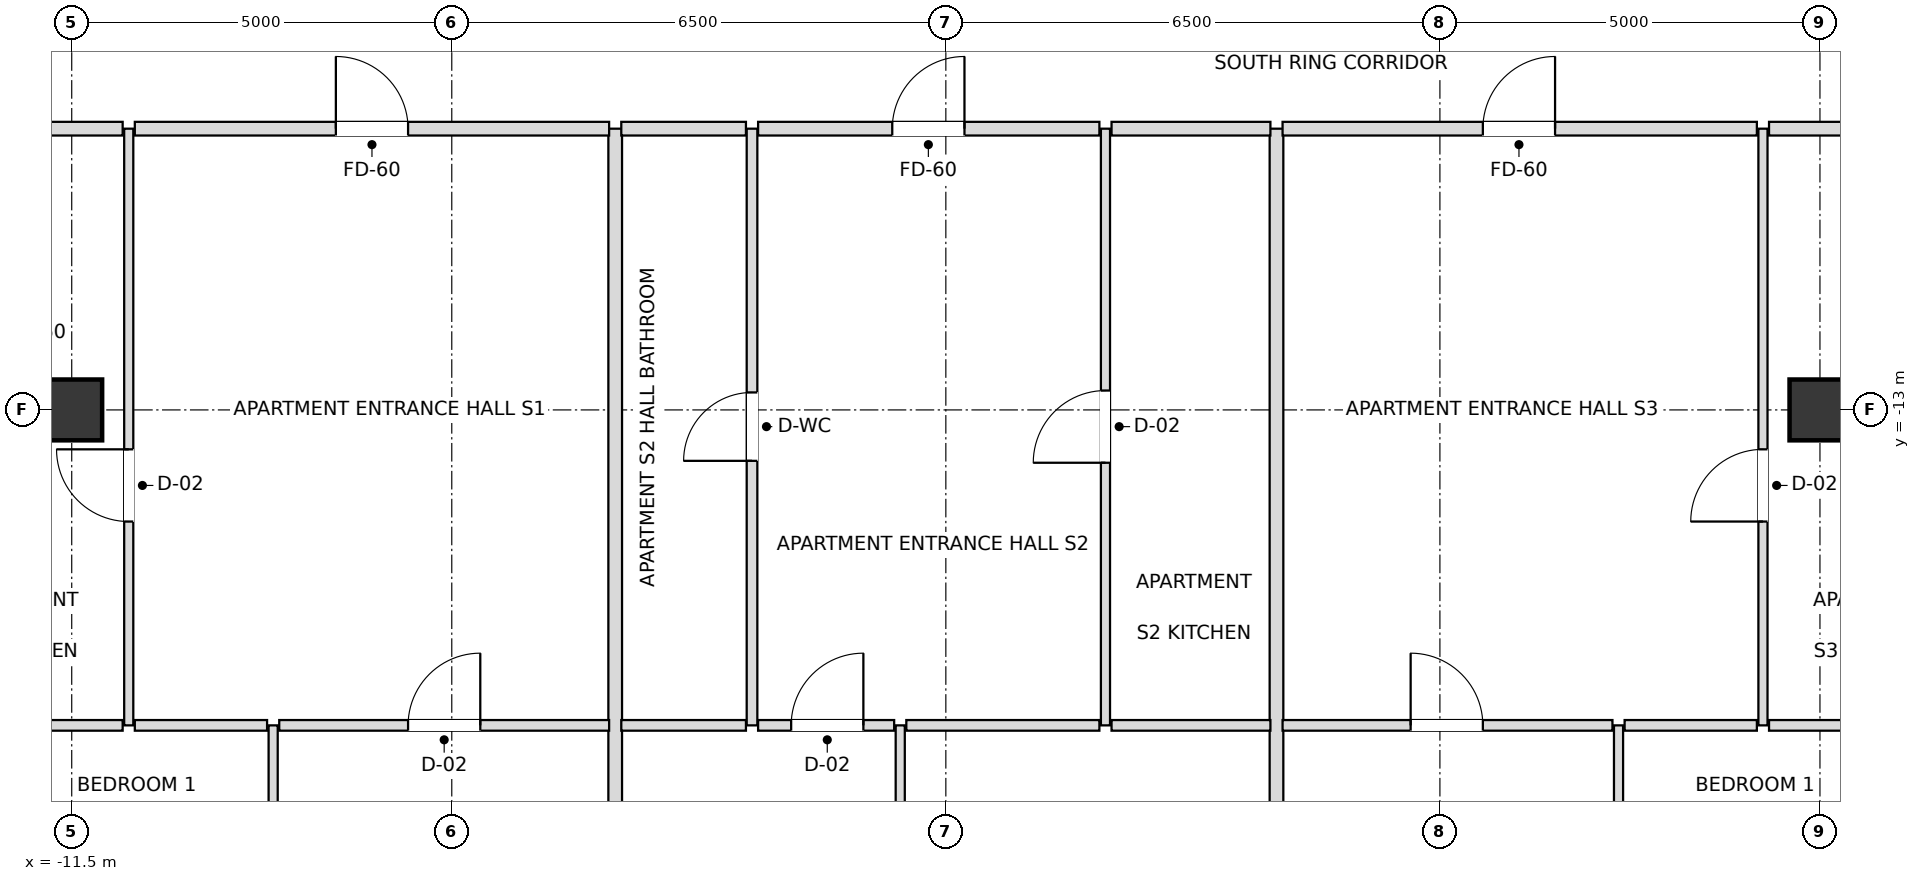
"""IFC4 building model, lengths in metres.
Left out: names, types, materials, properties, quantities, classifications, styles, units other than length and angle.
Written with IfcOpenShell. Run it as: python <this file> out.ifc"""

import sys

from ifc_helpers import new_model, si_unit, direction, frame, frame_2d, origin, origin_2d, place, context, subcontext, project, spatial, rectangle, extrude, element, fill, save


model = new_model("IFC4")
c1 = context("Model", 3, precision=1e-05, world=origin(), true_north=direction((0.0, 1.0)))
c2 = subcontext(c1, "Body", "Model", "MODEL_VIEW")
j1 = project(units=[si_unit("LENGTHUNIT", "METRE"), si_unit("PLANEANGLEUNIT", "RADIAN")], contexts=[c1])
p1 = place(None, origin())
s1 = spatial("IfcSite", under=j1, at=p1, CompositionType="ELEMENT")
p2 = place(p1, origin())
s2 = spatial("IfcBuilding", under=s1, at=p2, CompositionType="ELEMENT")
p3 = place(p2, frame((0.0, 0.0, 117.0)))
s3 = spatial("IfcBuildingStorey", under=s2, at=p3, CompositionType="ELEMENT", Elevation=117.0)
for number, where, z_axis, x_axis in (
    (1, (-11.5, -13.0, 0.0), (0.0, 0.0, 1.0), (1.0, 0.0, 0.0)),
    (2, (11.5, -13.0, 0.0), (0.0, 0.0, 1.0), (1.0, 0.0, 0.0)),
):
    element("IfcColumn", number, at=place(p3, frame(where, z_axis=z_axis, x_axis=x_axis)), inside=s3, PredefinedType="COLUMN", context=c2, shape_type="SweptSolid", body=[
        extrude(rectangle(XDim=0.8, YDim=0.8, at=origin_2d()), origin(), (0.0, 0.0, 1.0), 3.6),
    ])
p4 = place(p3, frame((-10.75, -17.15, 0.0), z_axis=(0.0, 0.0, 1.0), x_axis=(0.0, 1.0, 0.0)))
e3 = element("IfcWall", 3, at=p4, inside=s3, PredefinedType="PARTITIONING", context=c2, shape_type="SweptSolid", body=[
    extrude(rectangle(XDim=7.85, YDim=0.12, at=frame_2d((3.925, 0.0))), origin(), (0.0, 0.0, 1.0), 2.736),
])
p5 = place(p4, frame((2.681, 0.0, 0.0)))
e4 = element("IfcOpeningElement", 4, at=p5, cuts=e3, PredefinedType="OPENING", context=c2, shape_type="SweptSolid", body=[
    extrude(rectangle(XDim=0.95, YDim=2.1, at=frame_2d((0.475, 1.05))), frame((0.0, 0.07, 0.0), z_axis=(0.0, -1.0, 0.0), x_axis=(1.0, 0.0, 0.0)), (0.0, 0.0, 1.0), 0.14),
])
p6 = place(p3, frame((-8.85, -23.15, 0.0), z_axis=(0.0, 0.0, 1.0), x_axis=(0.0, 1.0, 0.0)))
e5 = element("IfcWall", 5, at=p6, inside=s3, PredefinedType="PARTITIONING", context=c2, shape_type="SweptSolid", body=[
    extrude(rectangle(XDim=6.0, YDim=0.12, at=frame_2d((3.0, 0.0))), origin(), (0.0, 0.0, 1.0), 2.736),
])
p7 = place(p6, frame((2.55, 0.0, 0.0)))
e6 = element("IfcOpeningElement", 6, at=p7, cuts=e5, PredefinedType="OPENING", context=c2, shape_type="SweptSolid", body=[
    extrude(rectangle(XDim=0.9, YDim=2.1, at=frame_2d((0.45, 1.05))), frame((0.0, 0.07, 0.0), z_axis=(0.0, -1.0, 0.0), x_axis=(1.0, 0.0, 0.0)), (0.0, 0.0, 1.0), 0.14),
])
p8 = place(p3, frame((-4.35, -23.15, 0.0), z_axis=(0.0, 0.0, 1.0), x_axis=(0.0, 1.0, 0.0)))
e7 = element("IfcWall", 7, at=p8, inside=s3, PredefinedType="PARTITIONING", context=c2, shape_type="SweptSolid", body=[
    extrude(rectangle(XDim=13.85, YDim=0.18, at=frame_2d((6.925, 0.0))), origin(), (0.0, 0.0, 1.0), 2.736),
])
p9 = place(p3, frame((-2.55, -17.15, 0.0), z_axis=(0.0, 0.0, 1.0), x_axis=(0.0, 1.0, 0.0)))
e8 = element("IfcWall", 8, at=p9, inside=s3, PredefinedType="PARTITIONING", context=c2, shape_type="SweptSolid", body=[
    extrude(rectangle(XDim=7.85, YDim=0.14, at=frame_2d((3.925, 0.0))), origin(), (0.0, 0.0, 1.0), 3.3),
])
p10 = place(p9, frame((3.48, 0.0, 0.0)))
e9 = element("IfcOpeningElement", 9, at=p10, cuts=e8, PredefinedType="OPENING", context=c2, shape_type="SweptSolid", body=[
    extrude(rectangle(XDim=0.9, YDim=2.1, at=frame_2d((0.45, 1.05))), frame((0.0, 0.08, 0.0), z_axis=(0.0, -1.0, 0.0), x_axis=(1.0, 0.0, 0.0)), (0.0, 0.0, 1.0), 0.16),
])
p11 = place(p3, frame((-0.6, -23.15, 0.0), z_axis=(0.0, 0.0, 1.0), x_axis=(0.0, 1.0, 0.0)))
e10 = element("IfcWall", 10, at=p11, inside=s3, PredefinedType="PARTITIONING", context=c2, shape_type="SweptSolid", body=[
    extrude(rectangle(XDim=6.0, YDim=0.12, at=frame_2d((3.0, 0.0))), origin(), (0.0, 0.0, 1.0), 2.736),
])
p12 = place(p11, frame((2.55, 0.0, 0.0)))
e11 = element("IfcOpeningElement", 11, at=p12, cuts=e10, PredefinedType="OPENING", context=c2, shape_type="SweptSolid", body=[
    extrude(rectangle(XDim=0.9, YDim=2.1, at=frame_2d((0.45, 1.05))), frame((0.0, 0.07, 0.0), z_axis=(0.0, -1.0, 0.0), x_axis=(1.0, 0.0, 0.0)), (0.0, 0.0, 1.0), 0.14),
])
p13 = place(p3, frame((2.1, -17.15, 0.0), z_axis=(0.0, 0.0, 1.0), x_axis=(0.0, 1.0, 0.0)))
e12 = element("IfcWall", 12, at=p13, inside=s3, PredefinedType="PARTITIONING", context=c2, shape_type="SweptSolid", body=[
    extrude(rectangle(XDim=7.85, YDim=0.12, at=frame_2d((3.925, 0.0))), origin(), (0.0, 0.0, 1.0), 3.3),
])
p14 = place(p13, frame((3.455, 0.0, 0.0)))
e13 = element("IfcOpeningElement", 13, at=p14, cuts=e12, PredefinedType="OPENING", context=c2, shape_type="SweptSolid", body=[
    extrude(rectangle(XDim=0.95, YDim=2.1, at=frame_2d((0.475, 1.05))), frame((0.0, 0.07, 0.0), z_axis=(0.0, -1.0, 0.0), x_axis=(1.0, 0.0, 0.0)), (0.0, 0.0, 1.0), 0.14),
])
p15 = place(p3, frame((4.35, -23.15, 0.0), z_axis=(0.0, 0.0, 1.0), x_axis=(0.0, 1.0, 0.0)))
e14 = element("IfcWall", 14, at=p15, inside=s3, PredefinedType="PARTITIONING", context=c2, shape_type="SweptSolid", body=[
    extrude(rectangle(XDim=13.85, YDim=0.18, at=frame_2d((6.925, 0.0))), origin(), (0.0, 0.0, 1.0), 2.736),
])
p16 = place(p3, frame((8.85, -23.15, 0.0), z_axis=(0.0, 0.0, 1.0), x_axis=(0.0, 1.0, 0.0)))
e15 = element("IfcWall", 15, at=p16, inside=s3, PredefinedType="PARTITIONING", context=c2, shape_type="SweptSolid", body=[
    extrude(rectangle(XDim=6.0, YDim=0.12, at=frame_2d((3.0, 0.0))), origin(), (0.0, 0.0, 1.0), 2.736),
])
p17 = place(p16, frame((2.55, 0.0, 0.0)))
e16 = element("IfcOpeningElement", 16, at=p17, cuts=e15, PredefinedType="OPENING", context=c2, shape_type="SweptSolid", body=[
    extrude(rectangle(XDim=0.9, YDim=2.1, at=frame_2d((0.45, 1.05))), frame((0.0, 0.07, 0.0), z_axis=(0.0, -1.0, 0.0), x_axis=(1.0, 0.0, 0.0)), (0.0, 0.0, 1.0), 0.14),
])
p18 = place(p3, frame((10.75, -17.15, 0.0), z_axis=(0.0, 0.0, 1.0), x_axis=(0.0, 1.0, 0.0)))
e17 = element("IfcWall", 17, at=p18, inside=s3, PredefinedType="PARTITIONING", context=c2, shape_type="SweptSolid", body=[
    extrude(rectangle(XDim=7.85, YDim=0.12, at=frame_2d((3.925, 0.0))), origin(), (0.0, 0.0, 1.0), 2.736),
])
p19 = place(p18, frame((2.681, 0.0, 0.0)))
e18 = element("IfcOpeningElement", 18, at=p19, cuts=e17, PredefinedType="OPENING", context=c2, shape_type="SweptSolid", body=[
    extrude(rectangle(XDim=0.95, YDim=2.1, at=frame_2d((0.475, 1.05))), frame((0.0, 0.07, 0.0), z_axis=(0.0, -1.0, 0.0), x_axis=(1.0, 0.0, 0.0)), (0.0, 0.0, 1.0), 0.14),
])
p20 = place(p3, frame((-12.17, -17.15, 0.0), z_axis=(0.0, 0.0, 1.0), x_axis=(1.0, 0.0, 0.0)))
e19 = element("IfcWall", 19, at=p20, inside=s3, PredefinedType="PARTITIONING", context=c2, shape_type="SweptSolid", body=[
    extrude(rectangle(XDim=1.34, YDim=0.14, at=frame_2d((0.67, 0.0))), origin(), (0.0, 0.0, 1.0), 2.656),
])
p21 = place(p3, frame((-10.67, -17.15, 0.0), z_axis=(0.0, 0.0, 1.0), x_axis=(1.0, 0.0, 0.0)))
e20 = element("IfcWall", 20, at=p21, inside=s3, PredefinedType="PARTITIONING", context=c2, shape_type="SweptSolid", body=[
    extrude(rectangle(XDim=1.74, YDim=0.14, at=frame_2d((0.87, 0.0))), origin(), (0.0, 0.0, 1.0), 3.3),
])
p22 = place(p3, frame((-8.77, -17.15, 0.0), z_axis=(0.0, 0.0, 1.0), x_axis=(1.0, 0.0, 0.0)))
e21 = element("IfcWall", 21, at=p22, inside=s3, PredefinedType="PARTITIONING", context=c2, shape_type="SweptSolid", body=[
    extrude(rectangle(XDim=4.34, YDim=0.14, at=frame_2d((2.17, 0.0))), origin(), (0.0, 0.0, 1.0), 2.736),
])
p23 = place(p22, frame((1.695, 0.0, 0.0)))
e22 = element("IfcOpeningElement", 22, at=p23, cuts=e21, PredefinedType="OPENING", context=c2, shape_type="SweptSolid", body=[
    extrude(rectangle(XDim=0.95, YDim=2.1, at=frame_2d((0.475, 1.05))), frame((0.0, 0.08, 0.0), z_axis=(0.0, -1.0, 0.0), x_axis=(1.0, 0.0, 0.0)), (0.0, 0.0, 1.0), 0.16),
])
p24 = place(p3, frame((-4.27, -17.15, 0.0), z_axis=(0.0, 0.0, 1.0), x_axis=(1.0, 0.0, 0.0)))
e23 = element("IfcWall", 23, at=p24, inside=s3, PredefinedType="PARTITIONING", context=c2, shape_type="SweptSolid", body=[
    extrude(rectangle(XDim=1.64, YDim=0.14, at=frame_2d((0.82, 0.0))), origin(), (0.0, 0.0, 1.0), 3.3),
])
p25 = place(p3, frame((-2.47, -17.15, 0.0), z_axis=(0.0, 0.0, 1.0), x_axis=(1.0, 0.0, 0.0)))
e24 = element("IfcWall", 24, at=p25, inside=s3, PredefinedType="PARTITIONING", context=c2, shape_type="SweptSolid", body=[
    extrude(rectangle(XDim=1.79, YDim=0.14, at=frame_2d((0.895, 0.0))), origin(), (0.0, 0.0, 1.0), 3.3),
])
p26 = place(p25, frame((0.435, 0.0, 0.0)))
e25 = element("IfcOpeningElement", 25, at=p26, cuts=e24, PredefinedType="OPENING", context=c2, shape_type="SweptSolid", body=[
    extrude(rectangle(XDim=0.95, YDim=2.1, at=frame_2d((0.475, 1.05))), frame((0.0, 0.08, 0.0), z_axis=(0.0, -1.0, 0.0), x_axis=(1.0, 0.0, 0.0)), (0.0, 0.0, 1.0), 0.16),
])
p27 = place(p3, frame((-0.52, -17.15, 0.0), z_axis=(0.0, 0.0, 1.0), x_axis=(1.0, 0.0, 0.0)))
e26 = element("IfcWall", 26, at=p27, inside=s3, PredefinedType="PARTITIONING", context=c2, shape_type="SweptSolid", body=[
    extrude(rectangle(XDim=2.54, YDim=0.14, at=frame_2d((1.27, 0.0))), origin(), (0.0, 0.0, 1.0), 3.3),
])
p28 = place(p3, frame((2.18, -17.15, 0.0), z_axis=(0.0, 0.0, 1.0), x_axis=(1.0, 0.0, 0.0)))
e27 = element("IfcWall", 27, at=p28, inside=s3, PredefinedType="PARTITIONING", context=c2, shape_type="SweptSolid", body=[
    extrude(rectangle(XDim=2.09, YDim=0.14, at=frame_2d((1.045, 0.0))), origin(), (0.0, 0.0, 1.0), 3.3),
])
p29 = place(p3, frame((4.43, -17.15, 0.0), z_axis=(0.0, 0.0, 1.0), x_axis=(1.0, 0.0, 0.0)))
e28 = element("IfcWall", 28, at=p29, inside=s3, PredefinedType="PARTITIONING", context=c2, shape_type="SweptSolid", body=[
    extrude(rectangle(XDim=4.34, YDim=0.14, at=frame_2d((2.17, 0.0))), origin(), (0.0, 0.0, 1.0), 2.736),
])
p30 = place(p29, frame((1.685, 0.0, 0.0)))
e29 = element("IfcOpeningElement", 29, at=p30, cuts=e28, PredefinedType="OPENING", context=c2, shape_type="SweptSolid", body=[
    extrude(rectangle(XDim=0.95, YDim=2.1, at=frame_2d((0.475, 1.05))), frame((0.0, 0.08, 0.0), z_axis=(0.0, -1.0, 0.0), x_axis=(1.0, 0.0, 0.0)), (0.0, 0.0, 1.0), 0.16),
])
p31 = place(p3, frame((8.93, -17.15, 0.0), z_axis=(0.0, 0.0, 1.0), x_axis=(1.0, 0.0, 0.0)))
e30 = element("IfcWall", 30, at=p31, inside=s3, PredefinedType="PARTITIONING", context=c2, shape_type="SweptSolid", body=[
    extrude(rectangle(XDim=1.74, YDim=0.14, at=frame_2d((0.87, 0.0))), origin(), (0.0, 0.0, 1.0), 3.3),
])
p32 = place(p3, frame((10.83, -17.15, 0.0), z_axis=(0.0, 0.0, 1.0), x_axis=(1.0, 0.0, 0.0)))
e31 = element("IfcWall", 31, at=p32, inside=s3, PredefinedType="PARTITIONING", context=c2, shape_type="SweptSolid", body=[
    extrude(rectangle(XDim=1.34, YDim=0.14, at=frame_2d((0.67, 0.0))), origin(), (0.0, 0.0, 1.0), 2.656),
])
p33 = place(p3, frame((-13.62, -9.3, 0.0), z_axis=(0.0, 0.0, 1.0), x_axis=(1.0, 0.0, 0.0)))
e32 = element("IfcWall", 32, at=p33, inside=s3, PredefinedType="PARTITIONING", context=c2, shape_type="SweptSolid", body=[
    extrude(rectangle(XDim=2.79, YDim=0.18, at=frame_2d((1.395, 0.0))), origin(), (0.0, 0.0, 1.0), 3.3),
])
p34 = place(p3, frame((-10.67, -9.3, 0.0), z_axis=(0.0, 0.0, 1.0), x_axis=(1.0, 0.0, 0.0)))
e33 = element("IfcWall", 33, at=p34, inside=s3, PredefinedType="PARTITIONING", context=c2, shape_type="SweptSolid", body=[
    extrude(rectangle(XDim=6.24, YDim=0.18, at=frame_2d((3.12, 0.0))), origin(), (0.0, 0.0, 1.0), 2.736),
])
p35 = place(p34, frame((2.645, 0.0, 0.0)))
e34 = element("IfcOpeningElement", 34, at=p35, cuts=e33, PredefinedType="OPENING", context=c2, shape_type="SweptSolid", body=[
    extrude(rectangle(XDim=0.95, YDim=2.15, at=frame_2d((0.475, 1.075))), frame((0.0, 0.1, 0.0), z_axis=(0.0, -1.0, 0.0), x_axis=(1.0, 0.0, 0.0)), (0.0, 0.0, 1.0), 0.2),
])
p36 = place(p3, frame((-4.27, -9.3, 0.0), z_axis=(0.0, 0.0, 1.0), x_axis=(1.0, 0.0, 0.0)))
e35 = element("IfcWall", 35, at=p36, inside=s3, PredefinedType="PARTITIONING", context=c2, shape_type="SweptSolid", body=[
    extrude(rectangle(XDim=1.64, YDim=0.18, at=frame_2d((0.82, 0.0))), origin(), (0.0, 0.0, 1.0), 3.3),
])
p37 = place(p3, frame((-2.47, -9.3, 0.0), z_axis=(0.0, 0.0, 1.0), x_axis=(1.0, 0.0, 0.0)))
e36 = element("IfcWall", 36, at=p37, inside=s3, PredefinedType="PARTITIONING", context=c2, shape_type="SweptSolid", body=[
    extrude(rectangle(XDim=4.49, YDim=0.18, at=frame_2d((2.245, 0.0))), origin(), (0.0, 0.0, 1.0), 3.3),
])
p38 = place(p37, frame((1.765, 0.0, 0.0)))
e37 = element("IfcOpeningElement", 37, at=p38, cuts=e36, PredefinedType="OPENING", context=c2, shape_type="SweptSolid", body=[
    extrude(rectangle(XDim=0.95, YDim=2.15, at=frame_2d((0.475, 1.075))), frame((0.0, 0.1, 0.0), z_axis=(0.0, -1.0, 0.0), x_axis=(1.0, 0.0, 0.0)), (0.0, 0.0, 1.0), 0.2),
])
p39 = place(p3, frame((2.18, -9.3, 0.0), z_axis=(0.0, 0.0, 1.0), x_axis=(1.0, 0.0, 0.0)))
e38 = element("IfcWall", 38, at=p39, inside=s3, PredefinedType="PARTITIONING", context=c2, shape_type="SweptSolid", body=[
    extrude(rectangle(XDim=2.09, YDim=0.18, at=frame_2d((1.045, 0.0))), origin(), (0.0, 0.0, 1.0), 3.3),
])
p40 = place(p3, frame((4.43, -9.3, 0.0), z_axis=(0.0, 0.0, 1.0), x_axis=(1.0, 0.0, 0.0)))
e39 = element("IfcWall", 39, at=p40, inside=s3, PredefinedType="PARTITIONING", context=c2, shape_type="SweptSolid", body=[
    extrude(rectangle(XDim=6.24, YDim=0.18, at=frame_2d((3.12, 0.0))), origin(), (0.0, 0.0, 1.0), 2.736),
])
p41 = place(p40, frame((2.635, 0.0, 0.0)))
e40 = element("IfcOpeningElement", 40, at=p41, cuts=e39, PredefinedType="OPENING", context=c2, shape_type="SweptSolid", body=[
    extrude(rectangle(XDim=0.95, YDim=2.15, at=frame_2d((0.475, 1.075))), frame((0.0, 0.1, 0.0), z_axis=(0.0, -1.0, 0.0), x_axis=(1.0, 0.0, 0.0)), (0.0, 0.0, 1.0), 0.2),
])
p42 = place(p3, frame((10.83, -9.3, 0.0), z_axis=(0.0, 0.0, 1.0), x_axis=(1.0, 0.0, 0.0)))
e41 = element("IfcWall", 41, at=p42, inside=s3, PredefinedType="PARTITIONING", context=c2, shape_type="SweptSolid", body=[
    extrude(rectangle(XDim=2.79, YDim=0.18, at=frame_2d((1.395, 0.0))), origin(), (0.0, 0.0, 1.0), 3.3),
])
p43 = place(p35, origin())
e42 = element("IfcDoor", 42, at=p43, inside=s3, OperationType="SINGLE_SWING_LEFT", PredefinedType="DOOR", context=c2, shape_type="SweptSolid", body=[
    extrude(rectangle(XDim=0.95, YDim=2.15, at=frame_2d((0.475, 1.075))), frame((0.0, 0.025, 0.0), z_axis=(0.0, -1.0, 0.0), x_axis=(1.0, 0.0, 0.0)), (0.0, 0.0, 1.0), 0.05),
])
fill(e34, e42)
p44 = place(p5, origin())
e43 = element("IfcDoor", 43, at=p44, inside=s3, OperationType="SINGLE_SWING_RIGHT", PredefinedType="DOOR", context=c2, shape_type="SweptSolid", body=[
    extrude(rectangle(XDim=0.95, YDim=2.1, at=frame_2d((0.475, 1.05))), frame((0.0, 0.025, 0.0), z_axis=(0.0, -1.0, 0.0), x_axis=(1.0, 0.0, 0.0)), (0.0, 0.0, 1.0), 0.05),
])
fill(e4, e43)
p45 = place(p23, origin())
e44 = element("IfcDoor", 44, at=p45, inside=s3, OperationType="SINGLE_SWING_RIGHT", PredefinedType="DOOR", context=c2, shape_type="SweptSolid", body=[
    extrude(rectangle(XDim=0.95, YDim=2.1, at=frame_2d((0.475, 1.05))), frame((0.0, 0.025, 0.0), z_axis=(0.0, -1.0, 0.0), x_axis=(1.0, 0.0, 0.0)), (0.0, 0.0, 1.0), 0.05),
])
fill(e22, e44)
p46 = place(p10, origin())
e45 = element("IfcDoor", 45, at=p46, inside=s3, OperationType="SINGLE_SWING_LEFT", PredefinedType="DOOR", context=c2, shape_type="SweptSolid", body=[
    extrude(rectangle(XDim=0.9, YDim=2.1, at=frame_2d((0.45, 1.05))), frame((0.0, 0.025, 0.0), z_axis=(0.0, -1.0, 0.0), x_axis=(1.0, 0.0, 0.0)), (0.0, 0.0, 1.0), 0.05),
])
fill(e9, e45)
p47 = place(p38, origin())
e46 = element("IfcDoor", 46, at=p47, inside=s3, OperationType="SINGLE_SWING_RIGHT", PredefinedType="DOOR", context=c2, shape_type="SweptSolid", body=[
    extrude(rectangle(XDim=0.95, YDim=2.15, at=frame_2d((0.475, 1.075))), frame((0.0, 0.025, 0.0), z_axis=(0.0, -1.0, 0.0), x_axis=(1.0, 0.0, 0.0)), (0.0, 0.0, 1.0), 0.05),
])
fill(e37, e46)
p48 = place(p14, origin())
e47 = element("IfcDoor", 47, at=p48, inside=s3, OperationType="SINGLE_SWING_LEFT", PredefinedType="DOOR", context=c2, shape_type="SweptSolid", body=[
    extrude(rectangle(XDim=0.95, YDim=2.1, at=frame_2d((0.475, 1.05))), frame((0.0, 0.025, 0.0), z_axis=(0.0, -1.0, 0.0), x_axis=(1.0, 0.0, 0.0)), (0.0, 0.0, 1.0), 0.05),
])
fill(e13, e47)
p49 = place(p26, origin())
e48 = element("IfcDoor", 48, at=p49, inside=s3, OperationType="SINGLE_SWING_RIGHT", PredefinedType="DOOR", context=c2, shape_type="SweptSolid", body=[
    extrude(rectangle(XDim=0.95, YDim=2.1, at=frame_2d((0.475, 1.05))), frame((0.0, 0.025, 0.0), z_axis=(0.0, -1.0, 0.0), x_axis=(1.0, 0.0, 0.0)), (0.0, 0.0, 1.0), 0.05),
])
fill(e25, e48)
p50 = place(p41, origin())
e49 = element("IfcDoor", 49, at=p50, inside=s3, OperationType="SINGLE_SWING_RIGHT", PredefinedType="DOOR", context=c2, shape_type="SweptSolid", body=[
    extrude(rectangle(XDim=0.95, YDim=2.15, at=frame_2d((0.475, 1.075))), frame((0.0, 0.025, 0.0), z_axis=(0.0, -1.0, 0.0), x_axis=(1.0, 0.0, 0.0)), (0.0, 0.0, 1.0), 0.05),
])
fill(e40, e49)
p51 = place(p19, origin())
e50 = element("IfcDoor", 50, at=p51, inside=s3, OperationType="SINGLE_SWING_LEFT", PredefinedType="DOOR", context=c2, shape_type="SweptSolid", body=[
    extrude(rectangle(XDim=0.95, YDim=2.1, at=frame_2d((0.475, 1.05))), frame((0.0, 0.025, 0.0), z_axis=(0.0, -1.0, 0.0), x_axis=(1.0, 0.0, 0.0)), (0.0, 0.0, 1.0), 0.05),
])
fill(e18, e50)
p52 = place(p30, origin())
e51 = element("IfcDoor", 51, at=p52, inside=s3, OperationType="SINGLE_SWING_LEFT", PredefinedType="DOOR", context=c2, shape_type="SweptSolid", body=[
    extrude(rectangle(XDim=0.95, YDim=2.1, at=frame_2d((0.475, 1.05))), frame((0.0, 0.025, 0.0), z_axis=(0.0, -1.0, 0.0), x_axis=(1.0, 0.0, 0.0)), (0.0, 0.0, 1.0), 0.05),
])
fill(e29, e51)
save(model, sys.argv[1])
